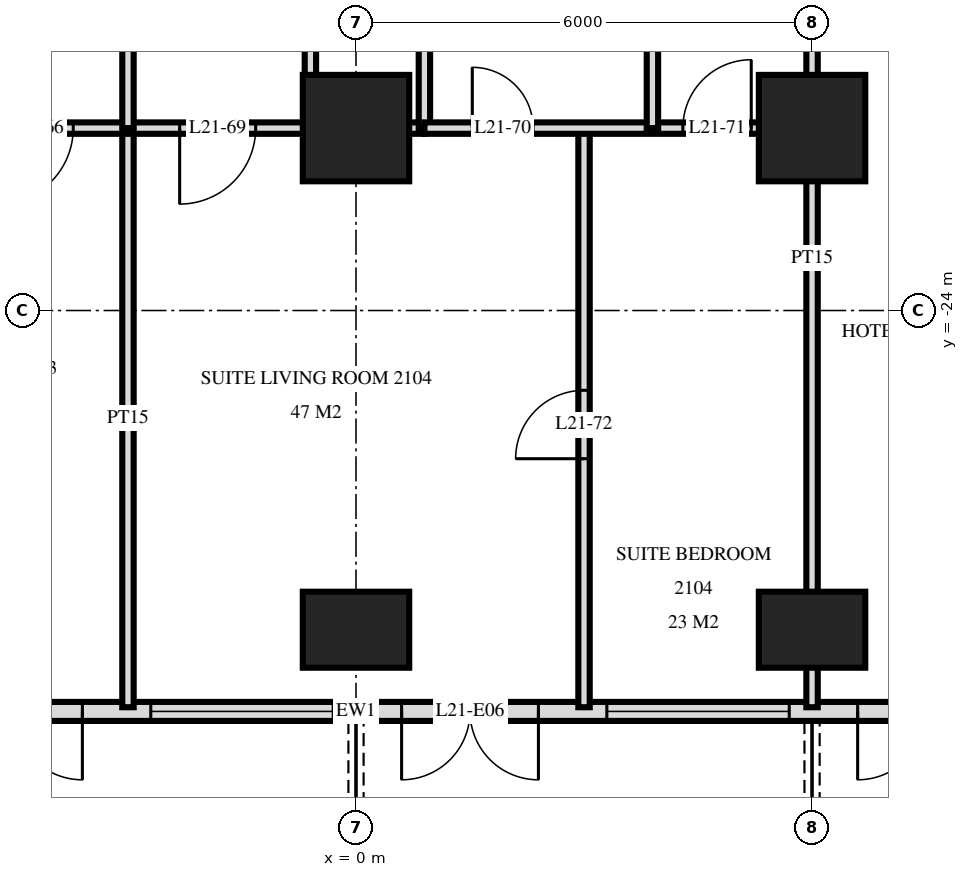
"""IFC4 building model, lengths in metres.
Left out: names, types, materials, properties, quantities, classifications, styles, units other than length and angle.
Written with IfcOpenShell. Run it as: python <this file> out.ifc"""

import sys

from ifc_helpers import new_model, si_unit, direction, frame, frame_2d, origin, origin_2d, place, context, subcontext, project, spatial, rectangle, extrude, element, fill, save


model = new_model("IFC4")
c1 = context("Model", 3, precision=1e-05, world=origin(), true_north=direction((0.0, 1.0)))
c2 = subcontext(c1, "Body", "Model", "MODEL_VIEW")
j1 = project(units=[si_unit("LENGTHUNIT", "METRE"), si_unit("PLANEANGLEUNIT", "RADIAN")], contexts=[c1])
p1 = place(None, origin())
s1 = spatial("IfcSite", under=j1, at=p1, CompositionType="ELEMENT")
p2 = place(p1, origin())
s2 = spatial("IfcBuilding", under=s1, at=p2, CompositionType="ELEMENT")
p3 = place(p2, frame((0.0, 0.0, 85.2)))
s3 = spatial("IfcBuildingStorey", under=s2, at=p3, CompositionType="ELEMENT", Elevation=85.2)
p4 = place(p3, frame((0.0, -28.2, 0.0), z_axis=(0.0, 0.0, 1.0), x_axis=(1.0, 0.0, 0.0)))
e1 = element("IfcColumn", 1, at=p4, inside=s3, PredefinedType="COLUMN", context=c2, shape_type="SweptSolid", body=[
    extrude(rectangle(XDim=1.4, YDim=1.0, at=origin_2d()), origin(), (0.0, 0.0, 1.0), 3.6),
])
p5 = place(p3, frame((0.0, -21.6, 0.0), z_axis=(0.0, 0.0, 1.0), x_axis=(1.0, 0.0, 0.0)))
e2 = element("IfcColumn", 2, at=p5, inside=s3, PredefinedType="COLUMN", context=c2, shape_type="SweptSolid", body=[
    extrude(rectangle(XDim=1.4, YDim=1.4, at=origin_2d()), origin(), (0.0, 0.0, 1.0), 3.6),
])
p6 = place(p3, frame((6.0, -28.2, 0.0), z_axis=(0.0, 0.0, 1.0), x_axis=(1.0, 0.0, 0.0)))
e3 = element("IfcColumn", 3, at=p6, inside=s3, PredefinedType="COLUMN", context=c2, shape_type="SweptSolid", body=[
    extrude(rectangle(XDim=1.4, YDim=1.0, at=origin_2d()), origin(), (0.0, 0.0, 1.0), 3.6),
])
p7 = place(p3, frame((6.0, -21.6, 0.0), z_axis=(0.0, 0.0, 1.0), x_axis=(1.0, 0.0, 0.0)))
e4 = element("IfcColumn", 4, at=p7, inside=s3, PredefinedType="COLUMN", context=c2, shape_type="SweptSolid", body=[
    extrude(rectangle(XDim=1.4, YDim=1.4, at=origin_2d()), origin(), (0.0, 0.0, 1.0), 3.6),
])
p8 = place(p3, frame((-28.775, -29.275, 0.0), z_axis=(0.0, 0.0, 1.0), x_axis=(1.0, 0.0, 0.0)))
e5 = element("IfcWall", 5, at=p8, inside=s3, PredefinedType="SOLIDWALL", context=c2, shape_type="SweptSolid", body=[
    extrude(rectangle(XDim=57.551, YDim=0.25, at=frame_2d((28.775, 0.0))), origin(), (0.0, 0.0, 1.0), 3.32),
])
p9 = place(p8, frame((0.575, 0.0, 0.0)))
e6 = element("IfcOpeningElement", 6, at=p9, cuts=e5, PredefinedType="OPENING", context=c2, shape_type="SweptSolid", body=[
    extrude(rectangle(XDim=1.8, YDim=2.4, at=frame_2d((0.9, 1.2))), frame((0.0, 0.135, 0.0), z_axis=(0.0, -1.0, 0.0), x_axis=(1.0, 0.0, 0.0)), (0.0, 0.0, 1.0), 0.27),
])
p10 = place(p8, frame((5.375, 0.0, 0.0)))
e7 = element("IfcOpeningElement", 7, at=p10, cuts=e5, PredefinedType="OPENING", context=c2, shape_type="SweptSolid", body=[
    extrude(rectangle(XDim=1.8, YDim=2.4, at=frame_2d((0.9, 1.2))), frame((0.0, 0.135, 0.0), z_axis=(0.0, -1.0, 0.0), x_axis=(1.0, 0.0, 0.0)), (0.0, 0.0, 1.0), 0.27),
])
p11 = place(p8, frame((8.075, 0.0, 0.3)))
e8 = element("IfcOpeningElement", 8, at=p11, cuts=e5, PredefinedType="OPENING", context=c2, shape_type="SweptSolid", body=[
    extrude(rectangle(XDim=2.4, YDim=2.1, at=frame_2d((1.2, 1.05))), frame((0.0, 0.135, 0.0), z_axis=(0.0, -1.0, 0.0), x_axis=(1.0, 0.0, 0.0)), (0.0, 0.0, 1.0), 0.27),
])
p12 = place(p8, frame((11.375, 0.0, 0.0)))
e9 = element("IfcOpeningElement", 9, at=p12, cuts=e5, PredefinedType="OPENING", context=c2, shape_type="SweptSolid", body=[
    extrude(rectangle(XDim=1.8, YDim=2.4, at=frame_2d((0.9, 1.2))), frame((0.0, 0.135, 0.0), z_axis=(0.0, -1.0, 0.0), x_axis=(1.0, 0.0, 0.0)), (0.0, 0.0, 1.0), 0.27),
])
p13 = place(p8, frame((14.075, 0.0, 0.3)))
e10 = element("IfcOpeningElement", 10, at=p13, cuts=e5, PredefinedType="OPENING", context=c2, shape_type="SweptSolid", body=[
    extrude(rectangle(XDim=2.4, YDim=2.1, at=frame_2d((1.2, 1.05))), frame((0.0, 0.135, 0.0), z_axis=(0.0, -1.0, 0.0), x_axis=(1.0, 0.0, 0.0)), (0.0, 0.0, 1.0), 0.27),
])
p14 = place(p8, frame((17.075, 0.0, 0.3)))
e11 = element("IfcOpeningElement", 11, at=p14, cuts=e5, PredefinedType="OPENING", context=c2, shape_type="SweptSolid", body=[
    extrude(rectangle(XDim=2.4, YDim=2.1, at=frame_2d((1.2, 1.05))), frame((0.0, 0.135, 0.0), z_axis=(0.0, -1.0, 0.0), x_axis=(1.0, 0.0, 0.0)), (0.0, 0.0, 1.0), 0.27),
])
p15 = place(p8, frame((20.375, 0.0, 0.0)))
e12 = element("IfcOpeningElement", 12, at=p15, cuts=e5, PredefinedType="OPENING", context=c2, shape_type="SweptSolid", body=[
    extrude(rectangle(XDim=1.8, YDim=2.4, at=frame_2d((0.9, 1.2))), frame((0.0, 0.135, 0.0), z_axis=(0.0, -1.0, 0.0), x_axis=(1.0, 0.0, 0.0)), (0.0, 0.0, 1.0), 0.27),
])
p16 = place(p8, frame((23.375, 0.0, 0.0)))
e13 = element("IfcOpeningElement", 13, at=p16, cuts=e5, PredefinedType="OPENING", context=c2, shape_type="SweptSolid", body=[
    extrude(rectangle(XDim=1.8, YDim=2.4, at=frame_2d((0.9, 1.2))), frame((0.0, 0.135, 0.0), z_axis=(0.0, -1.0, 0.0), x_axis=(1.0, 0.0, 0.0)), (0.0, 0.0, 1.0), 0.27),
])
p17 = place(p8, frame((26.075, 0.0, 0.3)))
e14 = element("IfcOpeningElement", 14, at=p17, cuts=e5, PredefinedType="OPENING", context=c2, shape_type="SweptSolid", body=[
    extrude(rectangle(XDim=2.4, YDim=2.1, at=frame_2d((1.2, 1.05))), frame((0.0, 0.135, 0.0), z_axis=(0.0, -1.0, 0.0), x_axis=(1.0, 0.0, 0.0)), (0.0, 0.0, 1.0), 0.27),
])
p18 = place(p8, frame((29.375, 0.0, 0.0)))
e15 = element("IfcOpeningElement", 15, at=p18, cuts=e5, PredefinedType="OPENING", context=c2, shape_type="SweptSolid", body=[
    extrude(rectangle(XDim=1.8, YDim=2.4, at=frame_2d((0.9, 1.2))), frame((0.0, 0.135, 0.0), z_axis=(0.0, -1.0, 0.0), x_axis=(1.0, 0.0, 0.0)), (0.0, 0.0, 1.0), 0.27),
])
p19 = place(p8, frame((32.075, 0.0, 0.3)))
e16 = element("IfcOpeningElement", 16, at=p19, cuts=e5, PredefinedType="OPENING", context=c2, shape_type="SweptSolid", body=[
    extrude(rectangle(XDim=2.4, YDim=2.1, at=frame_2d((1.2, 1.05))), frame((0.0, 0.135, 0.0), z_axis=(0.0, -1.0, 0.0), x_axis=(1.0, 0.0, 0.0)), (0.0, 0.0, 1.0), 0.27),
])
p20 = place(p8, frame((35.375, 0.0, 0.0)))
e17 = element("IfcOpeningElement", 17, at=p20, cuts=e5, PredefinedType="OPENING", context=c2, shape_type="SweptSolid", body=[
    extrude(rectangle(XDim=1.8, YDim=2.4, at=frame_2d((0.9, 1.2))), frame((0.0, 0.135, 0.0), z_axis=(0.0, -1.0, 0.0), x_axis=(1.0, 0.0, 0.0)), (0.0, 0.0, 1.0), 0.27),
])
p21 = place(p8, frame((38.075, 0.0, 0.3)))
e18 = element("IfcOpeningElement", 18, at=p21, cuts=e5, PredefinedType="OPENING", context=c2, shape_type="SweptSolid", body=[
    extrude(rectangle(XDim=2.4, YDim=2.1, at=frame_2d((1.2, 1.05))), frame((0.0, 0.135, 0.0), z_axis=(0.0, -1.0, 0.0), x_axis=(1.0, 0.0, 0.0)), (0.0, 0.0, 1.0), 0.27),
])
p22 = place(p8, frame((41.375, 0.0, 0.0)))
e19 = element("IfcOpeningElement", 19, at=p22, cuts=e5, PredefinedType="OPENING", context=c2, shape_type="SweptSolid", body=[
    extrude(rectangle(XDim=1.8, YDim=2.4, at=frame_2d((0.9, 1.2))), frame((0.0, 0.135, 0.0), z_axis=(0.0, -1.0, 0.0), x_axis=(1.0, 0.0, 0.0)), (0.0, 0.0, 1.0), 0.27),
])
p23 = place(p8, frame((44.075, 0.0, 0.3)))
e20 = element("IfcOpeningElement", 20, at=p23, cuts=e5, PredefinedType="OPENING", context=c2, shape_type="SweptSolid", body=[
    extrude(rectangle(XDim=2.4, YDim=2.1, at=frame_2d((1.2, 1.05))), frame((0.0, 0.135, 0.0), z_axis=(0.0, -1.0, 0.0), x_axis=(1.0, 0.0, 0.0)), (0.0, 0.0, 1.0), 0.27),
])
p24 = place(p8, frame((47.075, 0.0, 0.3)))
e21 = element("IfcOpeningElement", 21, at=p24, cuts=e5, PredefinedType="OPENING", context=c2, shape_type="SweptSolid", body=[
    extrude(rectangle(XDim=2.4, YDim=2.1, at=frame_2d((1.2, 1.05))), frame((0.0, 0.135, 0.0), z_axis=(0.0, -1.0, 0.0), x_axis=(1.0, 0.0, 0.0)), (0.0, 0.0, 1.0), 0.27),
])
p25 = place(p8, frame((50.375, 0.0, 0.0)))
e22 = element("IfcOpeningElement", 22, at=p25, cuts=e5, PredefinedType="OPENING", context=c2, shape_type="SweptSolid", body=[
    extrude(rectangle(XDim=1.8, YDim=2.4, at=frame_2d((0.9, 1.2))), frame((0.0, 0.135, 0.0), z_axis=(0.0, -1.0, 0.0), x_axis=(1.0, 0.0, 0.0)), (0.0, 0.0, 1.0), 0.27),
])
p26 = place(p8, frame((53.375, 0.0, 0.0)))
e23 = element("IfcOpeningElement", 23, at=p26, cuts=e5, PredefinedType="OPENING", context=c2, shape_type="SweptSolid", body=[
    extrude(rectangle(XDim=1.8, YDim=2.4, at=frame_2d((0.9, 1.2))), frame((0.0, 0.135, 0.0), z_axis=(0.0, -1.0, 0.0), x_axis=(1.0, 0.0, 0.0)), (0.0, 0.0, 1.0), 0.27),
])
p27 = place(p3, frame((6.0, -29.22, 0.0), z_axis=(0.0, 0.0, 1.0), x_axis=(0.0, 1.0, 0.0)))
e24 = element("IfcWall", 24, at=p27, inside=s3, PredefinedType="PARTITIONING", context=c2, shape_type="SweptSolid", body=[
    extrude(rectangle(XDim=11.82, YDim=0.15, at=frame_2d((5.91, 0.0))), origin(), (0.0, 0.0, 1.0), 3.32),
])
p28 = place(p3, frame((3.9, -21.6, 0.0), z_axis=(0.0, 0.0, 1.0), x_axis=(0.0, 1.0, 0.0)))
e25 = element("IfcWall", 25, at=p28, inside=s3, PredefinedType="PARTITIONING", context=c2, shape_type="SweptSolid", body=[
    extrude(rectangle(XDim=4.2, YDim=0.15, at=frame_2d((2.1, 0.0))), origin(), (0.0, 0.0, 1.0), 3.32),
])
p29 = place(p3, frame((3.0, -29.22, 0.0), z_axis=(0.0, 0.0, 1.0), x_axis=(0.0, 1.0, 0.0)))
e26 = element("IfcWall", 26, at=p29, inside=s3, PredefinedType="PARTITIONING", context=c2, shape_type="SweptSolid", body=[
    extrude(rectangle(XDim=7.62, YDim=0.15, at=frame_2d((3.81, 0.0))), origin(), (0.0, 0.0, 1.0), 3.32),
])
p30 = place(p29, frame((3.27, 0.0, 0.0)))
e27 = element("IfcOpeningElement", 27, at=p30, cuts=e26, PredefinedType="OPENING", context=c2, shape_type="SweptSolid", body=[
    extrude(rectangle(XDim=0.9, YDim=2.1, at=frame_2d((0.45, 1.05))), frame((0.0, 0.085, 0.0), z_axis=(0.0, -1.0, 0.0), x_axis=(1.0, 0.0, 0.0)), (0.0, 0.0, 1.0), 0.17),
])
p31 = place(p3, frame((0.9, -21.6, 0.0), z_axis=(0.0, 0.0, 1.0), x_axis=(0.0, 1.0, 0.0)))
e28 = element("IfcWall", 28, at=p31, inside=s3, PredefinedType="PLUMBINGWALL", context=c2, shape_type="SweptSolid", body=[
    extrude(rectangle(XDim=4.2, YDim=0.15, at=frame_2d((2.1, 0.0))), origin(), (0.0, 0.0, 1.0), 3.32),
])
p32 = place(p3, frame((-0.6, -21.6, 0.0), z_axis=(0.0, 0.0, 1.0), x_axis=(0.0, 1.0, 0.0)))
e29 = element("IfcWall", 29, at=p32, inside=s3, PredefinedType="PARTITIONING", context=c2, shape_type="SweptSolid", body=[
    extrude(rectangle(XDim=4.2, YDim=0.15, at=frame_2d((2.1, 0.0))), origin(), (0.0, 0.0, 1.0), 3.32),
])
p33 = place(p32, frame((1.62, 0.0, 0.0)))
e30 = element("IfcOpeningElement", 30, at=p33, cuts=e29, PredefinedType="OPENING", context=c2, shape_type="SweptSolid", body=[
    extrude(rectangle(XDim=1.0, YDim=2.1, at=frame_2d((0.5, 1.05))), frame((0.0, 0.085, 0.0), z_axis=(0.0, -1.0, 0.0), x_axis=(1.0, 0.0, 0.0)), (0.0, 0.0, 1.0), 0.17),
])
p34 = place(p3, frame((-3.0, -21.6, 0.0), z_axis=(0.0, 0.0, 1.0), x_axis=(0.0, 1.0, 0.0)))
e31 = element("IfcWall", 31, at=p34, inside=s3, PredefinedType="PARTITIONING", context=c2, shape_type="SweptSolid", body=[
    extrude(rectangle(XDim=4.2, YDim=0.15, at=frame_2d((2.1, 0.0))), origin(), (0.0, 0.0, 1.0), 3.32),
])
p35 = place(p3, frame((-3.0, -29.22, 0.0), z_axis=(0.0, 0.0, 1.0), x_axis=(0.0, 1.0, 0.0)))
e32 = element("IfcWall", 32, at=p35, inside=s3, PredefinedType="PARTITIONING", context=c2, shape_type="SweptSolid", body=[
    extrude(rectangle(XDim=7.62, YDim=0.15, at=frame_2d((3.81, 0.0))), origin(), (0.0, 0.0, 1.0), 3.32),
])
p36 = place(p3, frame((-5.4, -21.6, 0.0), z_axis=(0.0, 0.0, 1.0), x_axis=(1.0, 0.0, 0.0)))
e33 = element("IfcWall", 33, at=p36, inside=s3, PredefinedType="PARTITIONING", context=c2, shape_type="SweptSolid", body=[
    extrude(rectangle(XDim=4.8, YDim=0.15, at=frame_2d((2.4, 0.0))), origin(), (0.0, 0.0, 1.0), 3.32),
])
p37 = place(p36, frame((0.68, 0.0, 0.0)))
e34 = element("IfcOpeningElement", 34, at=p37, cuts=e33, PredefinedType="OPENING", context=c2, shape_type="SweptSolid", body=[
    extrude(rectangle(XDim=1.0, YDim=2.1, at=frame_2d((0.5, 1.05))), frame((0.0, 0.085, 0.0), z_axis=(0.0, -1.0, 0.0), x_axis=(1.0, 0.0, 0.0)), (0.0, 0.0, 1.0), 0.17),
])
p38 = place(p36, frame((3.08, 0.0, 0.0)))
e35 = element("IfcOpeningElement", 35, at=p38, cuts=e33, PredefinedType="OPENING", context=c2, shape_type="SweptSolid", body=[
    extrude(rectangle(XDim=1.0, YDim=2.1, at=frame_2d((0.5, 1.05))), frame((0.0, 0.085, 0.0), z_axis=(0.0, -1.0, 0.0), x_axis=(1.0, 0.0, 0.0)), (0.0, 0.0, 1.0), 0.17),
])
p39 = place(p3, frame((0.9, -21.6, 0.0), z_axis=(0.0, 0.0, 1.0), x_axis=(1.0, 0.0, 0.0)))
e36 = element("IfcWall", 36, at=p39, inside=s3, PredefinedType="PARTITIONING", context=c2, shape_type="SweptSolid", body=[
    extrude(rectangle(XDim=5.1, YDim=0.15, at=frame_2d((2.55, 0.0))), origin(), (0.0, 0.0, 1.0), 3.32),
])
p40 = place(p39, frame((0.63, 0.0, 0.0)))
e37 = element("IfcOpeningElement", 37, at=p40, cuts=e36, PredefinedType="OPENING", context=c2, shape_type="SweptSolid", body=[
    extrude(rectangle(XDim=0.8, YDim=2.1, at=frame_2d((0.4, 1.05))), frame((0.0, 0.085, 0.0), z_axis=(0.0, -1.0, 0.0), x_axis=(1.0, 0.0, 0.0)), (0.0, 0.0, 1.0), 0.17),
])
p41 = place(p39, frame((3.4, 0.0, 0.0)))
e38 = element("IfcOpeningElement", 38, at=p41, cuts=e36, PredefinedType="OPENING", context=c2, shape_type="SweptSolid", body=[
    extrude(rectangle(XDim=0.9, YDim=2.1, at=frame_2d((0.45, 1.05))), frame((0.0, 0.085, 0.0), z_axis=(0.0, -1.0, 0.0), x_axis=(1.0, 0.0, 0.0)), (0.0, 0.0, 1.0), 0.17),
])
p42 = place(p3, frame((-0.6, -21.6, 0.0), z_axis=(0.0, 0.0, 1.0), x_axis=(1.0, 0.0, 0.0)))
e39 = element("IfcWall", 39, at=p42, inside=s3, PredefinedType="PLUMBINGWALL", context=c2, shape_type="SweptSolid", body=[
    extrude(rectangle(XDim=1.5, YDim=0.15, at=frame_2d((0.75, 0.0))), origin(), (0.0, 0.0, 1.0), 3.32),
])
p43 = place(p16, frame((0.9, 0.0, 0.0), z_axis=(0.0, 0.0, 1.0), x_axis=(-1.0, 0.0, 0.0)))
e40 = element("IfcDoor", 40, at=p43, inside=s3, OperationType="DOUBLE_DOOR_SINGLE_SWING", PredefinedType="DOOR", context=c2, shape_type="SweptSolid", body=[
    extrude(rectangle(XDim=1.8, YDim=2.4, at=frame_2d((0.0, 1.2))), frame((0.0, -0.025, 0.0), z_axis=(0.0, 1.0, 0.0), x_axis=(-1.0, 0.0, 0.0)), (0.0, 0.0, 1.0), 0.05),
])
fill(e13, e40)
p44 = place(p17, origin())
e41 = element("IfcWindow", 41, at=p44, inside=s3, PartitioningType="SINGLE_PANEL", PredefinedType="WINDOW", context=c2, shape_type="SweptSolid", body=[
    extrude(rectangle(XDim=2.4, YDim=2.1, at=frame_2d((1.2, 1.05))), frame((0.0, 0.03, 0.0), z_axis=(0.0, -1.0, 0.0), x_axis=(1.0, 0.0, 0.0)), (0.0, 0.0, 1.0), 0.06),
])
fill(e14, e41)
p45 = place(p18, frame((0.9, 0.0, 0.0), z_axis=(0.0, 0.0, 1.0), x_axis=(-1.0, 0.0, 0.0)))
e42 = element("IfcDoor", 42, at=p45, inside=s3, OperationType="DOUBLE_DOOR_SINGLE_SWING", PredefinedType="DOOR", context=c2, shape_type="SweptSolid", body=[
    extrude(rectangle(XDim=1.8, YDim=2.4, at=frame_2d((0.0, 1.2))), frame((0.0, -0.025, 0.0), z_axis=(0.0, 1.0, 0.0), x_axis=(-1.0, 0.0, 0.0)), (0.0, 0.0, 1.0), 0.05),
])
fill(e15, e42)
p46 = place(p19, origin())
e43 = element("IfcWindow", 43, at=p46, inside=s3, PartitioningType="SINGLE_PANEL", PredefinedType="WINDOW", context=c2, shape_type="SweptSolid", body=[
    extrude(rectangle(XDim=2.4, YDim=2.1, at=frame_2d((1.2, 1.05))), frame((0.0, 0.03, 0.0), z_axis=(0.0, -1.0, 0.0), x_axis=(1.0, 0.0, 0.0)), (0.0, 0.0, 1.0), 0.06),
])
fill(e16, e43)
p47 = place(p20, frame((0.9, 0.0, 0.0), z_axis=(0.0, 0.0, 1.0), x_axis=(-1.0, 0.0, 0.0)))
e44 = element("IfcDoor", 44, at=p47, inside=s3, OperationType="DOUBLE_DOOR_SINGLE_SWING", PredefinedType="DOOR", context=c2, shape_type="SweptSolid", body=[
    extrude(rectangle(XDim=1.8, YDim=2.4, at=frame_2d((0.0, 1.2))), frame((0.0, -0.025, 0.0), z_axis=(0.0, 1.0, 0.0), x_axis=(-1.0, 0.0, 0.0)), (0.0, 0.0, 1.0), 0.05),
])
fill(e17, e44)
p48 = place(p37, frame((0.5, 0.0, 0.0), z_axis=(0.0, 0.0, 1.0), x_axis=(-1.0, 0.0, 0.0)))
e45 = element("IfcDoor", 45, at=p48, inside=s3, OperationType="SINGLE_SWING_LEFT", PredefinedType="DOOR", context=c2, shape_type="SweptSolid", body=[
    extrude(rectangle(XDim=1.0, YDim=2.1, at=frame_2d((0.0, 1.05))), frame((0.0, -0.025, 0.0), z_axis=(0.0, 1.0, 0.0), x_axis=(-1.0, 0.0, 0.0)), (0.0, 0.0, 1.0), 0.05),
])
fill(e34, e45)
p49 = place(p38, frame((0.5, 0.0, 0.0), z_axis=(0.0, 0.0, 1.0), x_axis=(-1.0, 0.0, 0.0)))
e46 = element("IfcDoor", 46, at=p49, inside=s3, OperationType="SINGLE_SWING_LEFT", PredefinedType="DOOR", context=c2, shape_type="SweptSolid", body=[
    extrude(rectangle(XDim=1.0, YDim=2.1, at=frame_2d((0.0, 1.05))), frame((0.0, -0.025, 0.0), z_axis=(0.0, 1.0, 0.0), x_axis=(-1.0, 0.0, 0.0)), (0.0, 0.0, 1.0), 0.05),
])
fill(e35, e46)
p50 = place(p40, origin())
e47 = element("IfcDoor", 47, at=p50, inside=s3, OperationType="SINGLE_SWING_RIGHT", PredefinedType="DOOR", context=c2, shape_type="SweptSolid", body=[
    extrude(rectangle(XDim=0.8, YDim=2.1, at=frame_2d((0.4, 1.05))), frame((0.0, 0.025, 0.0), z_axis=(0.0, -1.0, 0.0), x_axis=(1.0, 0.0, 0.0)), (0.0, 0.0, 1.0), 0.05),
])
fill(e37, e47)
p51 = place(p41, origin())
e48 = element("IfcDoor", 48, at=p51, inside=s3, OperationType="SINGLE_SWING_LEFT", PredefinedType="DOOR", context=c2, shape_type="SweptSolid", body=[
    extrude(rectangle(XDim=0.9, YDim=2.1, at=frame_2d((0.45, 1.05))), frame((0.0, 0.025, 0.0), z_axis=(0.0, -1.0, 0.0), x_axis=(1.0, 0.0, 0.0)), (0.0, 0.0, 1.0), 0.05),
])
fill(e38, e48)
p52 = place(p30, origin())
e49 = element("IfcDoor", 49, at=p52, inside=s3, OperationType="SINGLE_SWING_RIGHT", PredefinedType="DOOR", context=c2, shape_type="SweptSolid", body=[
    extrude(rectangle(XDim=0.9, YDim=2.1, at=frame_2d((0.45, 1.05))), frame((0.0, 0.025, 0.0), z_axis=(0.0, -1.0, 0.0), x_axis=(1.0, 0.0, 0.0)), (0.0, 0.0, 1.0), 0.05),
])
fill(e27, e49)
save(model, sys.argv[1])
